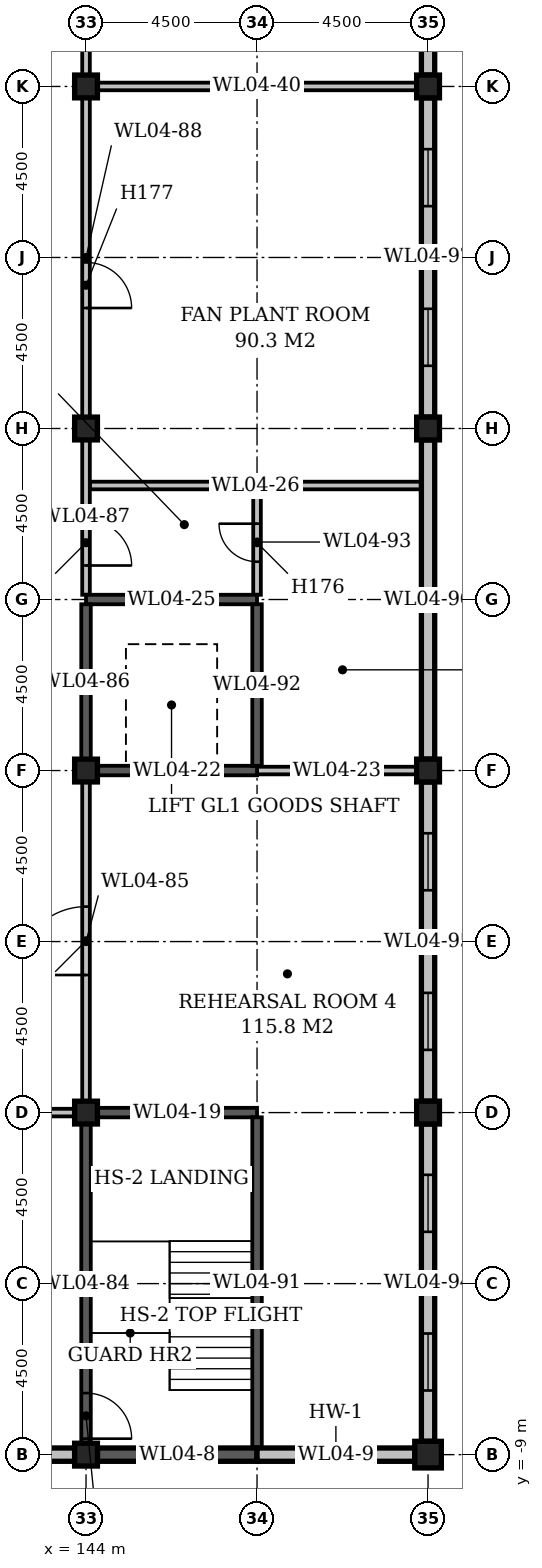
"""IFC4 building model, lengths in metres.
Left out: names, types, materials, properties, quantities, classifications, styles, units other than length and angle.
Written with IfcOpenShell. Run it as: python <this file> out.ifc"""

import sys

from ifc_helpers import new_model, si_unit, direction, frame, frame_2d, origin, origin_2d, place, context, subcontext, project, spatial, rectangle, extrude, element, fill, save


model = new_model("IFC4")
c1 = context("Model", 3, precision=1e-05, world=origin(), true_north=direction((0.0, 1.0)))
c2 = subcontext(c1, "Body", "Model", "MODEL_VIEW")
j1 = project(units=[si_unit("LENGTHUNIT", "METRE"), si_unit("PLANEANGLEUNIT", "RADIAN")], contexts=[c1])
p1 = place(None, origin())
s1 = spatial("IfcSite", under=j1, at=p1, CompositionType="ELEMENT")
p2 = place(p1, origin())
s2 = spatial("IfcBuilding", under=s1, at=p2, CompositionType="ELEMENT")
p3 = place(p2, frame((0.0, 0.0, 24.0)))
s3 = spatial("IfcBuildingStorey", under=s2, at=p3, CompositionType="ELEMENT", Elevation=24.0)
for number, where, z_axis, x_axis in (
    (1, (144.0, -9.0, 0.0), (0.0, 0.0, 1.0), (1.0, 0.0, 0.0)),
    (2, (144.0, 0.0, 0.0), (0.0, 0.0, 1.0), (1.0, 0.0, 0.0)),
    (3, (144.0, 9.0, 0.0), (0.0, 0.0, 1.0), (1.0, 0.0, 0.0)),
    (4, (144.0, 18.0, 0.0), (0.0, 0.0, 1.0), (1.0, 0.0, 0.0)),
    (5, (144.0, 27.0, 0.0), (0.0, 0.0, 1.0), (1.0, 0.0, 0.0)),
):
    element("IfcColumn", number, at=place(p3, frame(where, z_axis=z_axis, x_axis=x_axis)), inside=s3, PredefinedType="COLUMN", context=c2, shape_type="SweptSolid", body=[
        extrude(rectangle(XDim=0.6, YDim=0.6, at=origin_2d()), origin(), (0.0, 0.0, 1.0), 4.7),
    ])
p4 = place(p3, frame((153.0, -9.0, 0.0), z_axis=(0.0, 0.0, 1.0), x_axis=(1.0, 0.0, 0.0)))
e6 = element("IfcColumn", 6, at=p4, inside=s3, PredefinedType="COLUMN", context=c2, shape_type="SweptSolid", body=[
    extrude(rectangle(XDim=0.7, YDim=0.7, at=origin_2d()), origin(), (0.0, 0.0, 1.0), 4.7),
])
for number, where, z_axis, x_axis in (
    (7, (153.0, 0.0, 0.0), (0.0, 0.0, 1.0), (1.0, 0.0, 0.0)),
    (8, (153.0, 9.0, 0.0), (0.0, 0.0, 1.0), (1.0, 0.0, 0.0)),
    (9, (153.0, 18.0, 0.0), (0.0, 0.0, 1.0), (1.0, 0.0, 0.0)),
    (10, (153.0, 27.0, 0.0), (0.0, 0.0, 1.0), (1.0, 0.0, 0.0)),
):
    element("IfcColumn", number, at=place(p3, frame(where, z_axis=z_axis, x_axis=x_axis)), inside=s3, PredefinedType="COLUMN", context=c2, shape_type="SweptSolid", body=[
        extrude(rectangle(XDim=0.6, YDim=0.6, at=origin_2d()), origin(), (0.0, 0.0, 1.0), 4.7),
    ])
p5 = place(p3, frame((135.3, -9.0, 0.0), z_axis=(0.0, 0.0, 1.0), x_axis=(1.0, 0.0, 0.0)))
e11 = element("IfcWall", 11, at=p5, inside=s3, PredefinedType="STANDARD", context=c2, shape_type="SweptSolid", body=[
    extrude(rectangle(XDim=8.4, YDim=0.35, at=frame_2d((4.2, 0.0))), origin(), (0.0, 0.0, 1.0), 4.1),
])
p6 = place(p5, frame((1.35, 0.0, 1.0)))
e12 = element("IfcOpeningElement", 12, at=p6, cuts=e11, PredefinedType="OPENING", context=c2, shape_type="SweptSolid", body=[
    extrude(rectangle(XDim=1.5, YDim=2.4, at=frame_2d((0.75, 1.2))), frame((0.0, 0.187, 0.0), z_axis=(0.0, -1.0, 0.0), x_axis=(1.0, 0.0, 0.0)), (0.0, 0.0, 1.0), 0.374),
])
p7 = place(p3, frame((144.3, -9.0, 0.0), z_axis=(0.0, 0.0, 1.0), x_axis=(1.0, 0.0, 0.0)))
e13 = element("IfcWall", 13, at=p7, inside=s3, PredefinedType="STANDARD", context=c2, shape_type="SweptSolid", body=[
    extrude(rectangle(XDim=4.2, YDim=0.35, at=frame_2d((2.1, 0.0))), origin(), (0.0, 0.0, 1.0), 4.1),
])
p8 = place(p3, frame((148.5, -9.0, 0.0), z_axis=(0.0, 0.0, 1.0), x_axis=(1.0, 0.0, 0.0)))
e14 = element("IfcWall", 14, at=p8, inside=s3, PredefinedType="STANDARD", context=c2, shape_type="SweptSolid", body=[
    extrude(rectangle(XDim=4.15, YDim=0.35, at=frame_2d((2.075, 0.0))), origin(), (0.0, 0.0, 1.0), 4.1),
])
p9 = place(p8, frame((1.325, 0.0, 1.0)))
e15 = element("IfcOpeningElement", 15, at=p9, cuts=e14, PredefinedType="OPENING", context=c2, shape_type="SweptSolid", body=[
    extrude(rectangle(XDim=1.5, YDim=2.4, at=frame_2d((0.75, 1.2))), frame((0.0, 0.187, 0.0), z_axis=(0.0, -1.0, 0.0), x_axis=(1.0, 0.0, 0.0)), (0.0, 0.0, 1.0), 0.374),
])
p10 = place(p3, frame((135.4, 0.0, 0.0), z_axis=(0.0, 0.0, 1.0), x_axis=(1.0, 0.0, 0.0)))
e16 = element("IfcWall", 16, at=p10, inside=s3, PredefinedType="STANDARD", context=c2, shape_type="SweptSolid", body=[
    extrude(rectangle(XDim=8.3, YDim=0.2, at=frame_2d((4.15, 0.0))), origin(), (0.0, 0.0, 1.0), 4.7),
])
p11 = place(p10, frame((5.77, 0.0, 0.0)))
e17 = element("IfcOpeningElement", 17, at=p11, cuts=e16, PredefinedType="OPENING", context=c2, shape_type="SweptSolid", body=[
    extrude(rectangle(XDim=1.2, YDim=2.1, at=frame_2d((0.6, 1.05))), frame((0.0, 0.112, 0.0), z_axis=(0.0, -1.0, 0.0), x_axis=(1.0, 0.0, 0.0)), (0.0, 0.0, 1.0), 0.224),
])
p12 = place(p10, frame((1.37, 0.0, 0.0)))
e18 = element("IfcOpeningElement", 18, at=p12, cuts=e16, PredefinedType="OPENING", context=c2, shape_type="SweptSolid", body=[
    extrude(rectangle(XDim=1.0, YDim=2.1, at=frame_2d((0.5, 1.05))), frame((0.0, 0.112, 0.0), z_axis=(0.0, -1.0, 0.0), x_axis=(1.0, 0.0, 0.0)), (0.0, 0.0, 1.0), 0.224),
])
for number, where, z_axis, x_axis in (
    (19, (144.3, 0.0, 0.0), (0.0, 0.0, 1.0), (1.0, 0.0, 0.0)),
    (20, (144.3, 9.0, 0.0), (0.0, 0.0, 1.0), (1.0, 0.0, 0.0)),
):
    element("IfcWall", number, at=place(p3, frame(where, z_axis=z_axis, x_axis=x_axis)), inside=s3, PredefinedType="STANDARD", context=c2, shape_type="SweptSolid", body=[
        extrude(rectangle(XDim=4.2, YDim=0.25, at=frame_2d((2.1, 0.0))), origin(), (0.0, 0.0, 1.0), 4.7),
    ])
p13 = place(p3, frame((148.5, 9.0, 0.0), z_axis=(0.0, 0.0, 1.0), x_axis=(1.0, 0.0, 0.0)))
e21 = element("IfcWall", 21, at=p13, inside=s3, PredefinedType="STANDARD", context=c2, shape_type="SweptSolid", body=[
    extrude(rectangle(XDim=4.2, YDim=0.2, at=frame_2d((2.1, 0.0))), origin(), (0.0, 0.0, 1.0), 4.7),
])
p14 = place(p3, frame((144.0, 13.5, 0.0), z_axis=(0.0, 0.0, 1.0), x_axis=(1.0, 0.0, 0.0)))
e22 = element("IfcWall", 22, at=p14, inside=s3, PredefinedType="STANDARD", context=c2, shape_type="SweptSolid", body=[
    extrude(rectangle(XDim=4.5, YDim=0.25, at=frame_2d((2.25, 0.0))), origin(), (0.0, 0.0, 1.0), 4.7),
])
p15 = place(p14, frame((1.72, 0.0, 0.0)))
e23 = element("IfcOpeningElement", 23, at=p15, cuts=e22, PredefinedType="OPENING", context=c2, shape_type="SweptSolid", body=[
    extrude(rectangle(XDim=1.1, YDim=2.1, at=frame_2d((0.55, 1.05))), frame((0.0, 0.137, 0.0), z_axis=(0.0, -1.0, 0.0), x_axis=(1.0, 0.0, 0.0)), (0.0, 0.0, 1.0), 0.274),
])
p16 = place(p3, frame((144.1, 16.5, 0.0), z_axis=(0.0, 0.0, 1.0), x_axis=(1.0, 0.0, 0.0)))
e24 = element("IfcWall", 24, at=p16, inside=s3, PredefinedType="STANDARD", context=c2, shape_type="SweptSolid", body=[
    extrude(rectangle(XDim=8.725, YDim=0.2, at=frame_2d((4.362, 0.0))), origin(), (0.0, 0.0, 1.0), 4.7),
])
p17 = place(p3, frame((144.3, 27.0, 0.0), z_axis=(0.0, 0.0, 1.0), x_axis=(1.0, 0.0, 0.0)))
e25 = element("IfcWall", 25, at=p17, inside=s3, PredefinedType="STANDARD", context=c2, shape_type="SweptSolid", body=[
    extrude(rectangle(XDim=8.4, YDim=0.2, at=frame_2d((4.2, 0.0))), origin(), (0.0, 0.0, 1.0), 4.7),
])
p18 = place(p3, frame((144.0, -8.7, 0.0), z_axis=(0.0, 0.0, 1.0), x_axis=(0.0, 1.0, 0.0)))
e26 = element("IfcWall", 26, at=p18, inside=s3, PredefinedType="STANDARD", context=c2, shape_type="SweptSolid", body=[
    extrude(rectangle(XDim=8.4, YDim=0.25, at=frame_2d((4.2, 0.0))), origin(), (0.0, 0.0, 1.0), 4.7),
])
p19 = place(p18, frame((0.12, 0.0, 0.0)))
e27 = element("IfcOpeningElement", 27, at=p19, cuts=e26, PredefinedType="OPENING", context=c2, shape_type="SweptSolid", body=[
    extrude(rectangle(XDim=1.2, YDim=2.1, at=frame_2d((0.6, 1.05))), frame((0.0, 0.137, 0.0), z_axis=(0.0, -1.0, 0.0), x_axis=(1.0, 0.0, 0.0)), (0.0, 0.0, 1.0), 0.274),
])
p20 = place(p3, frame((144.0, 0.3, 0.0), z_axis=(0.0, 0.0, 1.0), x_axis=(0.0, 1.0, 0.0)))
e28 = element("IfcWall", 28, at=p20, inside=s3, PredefinedType="STANDARD", context=c2, shape_type="SweptSolid", body=[
    extrude(rectangle(XDim=8.4, YDim=0.2, at=frame_2d((4.2, 0.0))), origin(), (0.0, 0.0, 1.0), 4.7),
])
p21 = place(p20, frame((3.32, 0.0, 0.0)))
e29 = element("IfcOpeningElement", 29, at=p21, cuts=e28, PredefinedType="OPENING", context=c2, shape_type="SweptSolid", body=[
    extrude(rectangle(XDim=1.8, YDim=2.4, at=frame_2d((0.9, 1.2))), frame((0.0, 0.112, 0.0), z_axis=(0.0, -1.0, 0.0), x_axis=(1.0, 0.0, 0.0)), (0.0, 0.0, 1.0), 0.224),
])
p22 = place(p3, frame((144.0, 9.3, 0.0), z_axis=(0.0, 0.0, 1.0), x_axis=(0.0, 1.0, 0.0)))
e30 = element("IfcWall", 30, at=p22, inside=s3, PredefinedType="STANDARD", context=c2, shape_type="SweptSolid", body=[
    extrude(rectangle(XDim=4.075, YDim=0.25, at=frame_2d((2.038, 0.0))), origin(), (0.0, 0.0, 1.0), 4.7),
])
p23 = place(p3, frame((144.0, 13.625, 0.0), z_axis=(0.0, 0.0, 1.0), x_axis=(0.0, 1.0, 0.0)))
e31 = element("IfcWall", 31, at=p23, inside=s3, PredefinedType="STANDARD", context=c2, shape_type="SweptSolid", body=[
    extrude(rectangle(XDim=4.075, YDim=0.2, at=frame_2d((2.038, 0.0))), origin(), (0.0, 0.0, 1.0), 4.7),
])
p24 = place(p23, frame((0.77, 0.0, 0.0)))
e32 = element("IfcOpeningElement", 32, at=p24, cuts=e31, PredefinedType="OPENING", context=c2, shape_type="SweptSolid", body=[
    extrude(rectangle(XDim=1.2, YDim=2.1, at=frame_2d((0.6, 1.05))), frame((0.0, 0.112, 0.0), z_axis=(0.0, -1.0, 0.0), x_axis=(1.0, 0.0, 0.0)), (0.0, 0.0, 1.0), 0.224),
])
p25 = place(p3, frame((144.0, 18.3, 0.0), z_axis=(0.0, 0.0, 1.0), x_axis=(0.0, 1.0, 0.0)))
e33 = element("IfcWall", 33, at=p25, inside=s3, PredefinedType="STANDARD", context=c2, shape_type="SweptSolid", body=[
    extrude(rectangle(XDim=8.4, YDim=0.2, at=frame_2d((4.2, 0.0))), origin(), (0.0, 0.0, 1.0), 4.7),
])
p26 = place(p25, frame((2.87, 0.0, 0.0)))
e34 = element("IfcOpeningElement", 34, at=p26, cuts=e33, PredefinedType="OPENING", context=c2, shape_type="SweptSolid", body=[
    extrude(rectangle(XDim=1.2, YDim=2.1, at=frame_2d((0.6, 1.05))), frame((0.0, 0.112, 0.0), z_axis=(0.0, -1.0, 0.0), x_axis=(1.0, 0.0, 0.0)), (0.0, 0.0, 1.0), 0.224),
])
p27 = place(p3, frame((144.0, 27.3, 0.0), z_axis=(0.0, 0.0, 1.0), x_axis=(0.0, 1.0, 0.0)))
e35 = element("IfcWall", 35, at=p27, inside=s3, PredefinedType="STANDARD", context=c2, shape_type="SweptSolid", body=[
    extrude(rectangle(XDim=8.4, YDim=0.2, at=frame_2d((4.2, 0.0))), origin(), (0.0, 0.0, 1.0), 4.7),
])
p28 = place(p27, frame((3.62, 0.0, 0.0)))
e36 = element("IfcOpeningElement", 36, at=p28, cuts=e35, PredefinedType="OPENING", context=c2, shape_type="SweptSolid", body=[
    extrude(rectangle(XDim=1.2, YDim=2.1, at=frame_2d((0.6, 1.05))), frame((0.0, 0.112, 0.0), z_axis=(0.0, -1.0, 0.0), x_axis=(1.0, 0.0, 0.0)), (0.0, 0.0, 1.0), 0.224),
])
p29 = place(p3, frame((148.5, -8.825, 0.0), z_axis=(0.0, 0.0, 1.0), x_axis=(0.0, 1.0, 0.0)))
e37 = element("IfcWall", 37, at=p29, inside=s3, PredefinedType="STANDARD", context=c2, shape_type="SweptSolid", body=[
    extrude(rectangle(XDim=8.7, YDim=0.25, at=frame_2d((4.35, 0.0))), origin(), (0.0, 0.0, 1.0), 4.7),
])
p30 = place(p3, frame((148.5, 9.125, 0.0), z_axis=(0.0, 0.0, 1.0), x_axis=(0.0, 1.0, 0.0)))
e38 = element("IfcWall", 38, at=p30, inside=s3, PredefinedType="STANDARD", context=c2, shape_type="SweptSolid", body=[
    extrude(rectangle(XDim=4.25, YDim=0.25, at=frame_2d((2.125, 0.0))), origin(), (0.0, 0.0, 1.0), 4.7),
])
p31 = place(p3, frame((148.5, 13.625, 0.0), z_axis=(0.0, 0.0, 1.0), x_axis=(0.0, 1.0, 0.0)))
e39 = element("IfcWall", 39, at=p31, inside=s3, PredefinedType="STANDARD", context=c2, shape_type="SweptSolid", body=[
    extrude(rectangle(XDim=2.775, YDim=0.2, at=frame_2d((1.387, 0.0))), origin(), (0.0, 0.0, 1.0), 4.7),
])
p32 = place(p31, frame((0.87, 0.0, 0.0)))
e40 = element("IfcOpeningElement", 40, at=p32, cuts=e39, PredefinedType="OPENING", context=c2, shape_type="SweptSolid", body=[
    extrude(rectangle(XDim=1.0, YDim=2.1, at=frame_2d((0.5, 1.05))), frame((0.0, 0.112, 0.0), z_axis=(0.0, -1.0, 0.0), x_axis=(1.0, 0.0, 0.0)), (0.0, 0.0, 1.0), 0.224),
])
p33 = place(p3, frame((153.0, -8.65, 0.0), z_axis=(0.0, 0.0, 1.0), x_axis=(0.0, 1.0, 0.0)))
e41 = element("IfcWall", 41, at=p33, inside=s3, PredefinedType="STANDARD", context=c2, shape_type="SweptSolid", body=[
    extrude(rectangle(XDim=8.35, YDim=0.35, at=frame_2d((4.175, 0.0))), origin(), (0.0, 0.0, 1.0), 4.1),
])
p34 = place(p33, frame((1.337, 0.0, 1.0)))
e42 = element("IfcOpeningElement", 42, at=p34, cuts=e41, PredefinedType="OPENING", context=c2, shape_type="SweptSolid", body=[
    extrude(rectangle(XDim=1.5, YDim=2.4, at=frame_2d((0.75, 1.2))), frame((0.0, 0.187, 0.0), z_axis=(0.0, -1.0, 0.0), x_axis=(1.0, 0.0, 0.0)), (0.0, 0.0, 1.0), 0.374),
])
p35 = place(p33, frame((5.512, 0.0, 1.0)))
e43 = element("IfcOpeningElement", 43, at=p35, cuts=e41, PredefinedType="OPENING", context=c2, shape_type="SweptSolid", body=[
    extrude(rectangle(XDim=1.5, YDim=2.4, at=frame_2d((0.75, 1.2))), frame((0.0, 0.187, 0.0), z_axis=(0.0, -1.0, 0.0), x_axis=(1.0, 0.0, 0.0)), (0.0, 0.0, 1.0), 0.374),
])
p36 = place(p3, frame((153.0, 0.3, 0.0), z_axis=(0.0, 0.0, 1.0), x_axis=(0.0, 1.0, 0.0)))
e44 = element("IfcWall", 44, at=p36, inside=s3, PredefinedType="STANDARD", context=c2, shape_type="SweptSolid", body=[
    extrude(rectangle(XDim=8.4, YDim=0.35, at=frame_2d((4.2, 0.0))), origin(), (0.0, 0.0, 1.0), 4.1),
])
p37 = place(p36, frame((1.35, 0.0, 1.0)))
e45 = element("IfcOpeningElement", 45, at=p37, cuts=e44, PredefinedType="OPENING", context=c2, shape_type="SweptSolid", body=[
    extrude(rectangle(XDim=1.5, YDim=2.4, at=frame_2d((0.75, 1.2))), frame((0.0, 0.187, 0.0), z_axis=(0.0, -1.0, 0.0), x_axis=(1.0, 0.0, 0.0)), (0.0, 0.0, 1.0), 0.374),
])
p38 = place(p36, frame((5.55, 0.0, 1.0)))
e46 = element("IfcOpeningElement", 46, at=p38, cuts=e44, PredefinedType="OPENING", context=c2, shape_type="SweptSolid", body=[
    extrude(rectangle(XDim=1.5, YDim=2.4, at=frame_2d((0.75, 1.2))), frame((0.0, 0.187, 0.0), z_axis=(0.0, -1.0, 0.0), x_axis=(1.0, 0.0, 0.0)), (0.0, 0.0, 1.0), 0.374),
])
p39 = place(p3, frame((153.0, 9.3, 0.0), z_axis=(0.0, 0.0, 1.0), x_axis=(0.0, 1.0, 0.0)))
e47 = element("IfcWall", 47, at=p39, inside=s3, PredefinedType="STANDARD", context=c2, shape_type="SweptSolid", body=[
    extrude(rectangle(XDim=8.4, YDim=0.35, at=frame_2d((4.2, 0.0))), origin(), (0.0, 0.0, 1.0), 4.1),
])
p40 = place(p3, frame((153.0, 18.3, 0.0), z_axis=(0.0, 0.0, 1.0), x_axis=(0.0, 1.0, 0.0)))
e48 = element("IfcWall", 48, at=p40, inside=s3, PredefinedType="STANDARD", context=c2, shape_type="SweptSolid", body=[
    extrude(rectangle(XDim=8.4, YDim=0.35, at=frame_2d((4.2, 0.0))), origin(), (0.0, 0.0, 1.0), 4.1),
])
p41 = place(p40, frame((1.35, 0.0, 1.0)))
e49 = element("IfcOpeningElement", 49, at=p41, cuts=e48, PredefinedType="OPENING", context=c2, shape_type="SweptSolid", body=[
    extrude(rectangle(XDim=1.5, YDim=2.4, at=frame_2d((0.75, 1.2))), frame((0.0, 0.187, 0.0), z_axis=(0.0, -1.0, 0.0), x_axis=(1.0, 0.0, 0.0)), (0.0, 0.0, 1.0), 0.374),
])
p42 = place(p40, frame((5.55, 0.0, 1.0)))
e50 = element("IfcOpeningElement", 50, at=p42, cuts=e48, PredefinedType="OPENING", context=c2, shape_type="SweptSolid", body=[
    extrude(rectangle(XDim=1.5, YDim=2.4, at=frame_2d((0.75, 1.2))), frame((0.0, 0.187, 0.0), z_axis=(0.0, -1.0, 0.0), x_axis=(1.0, 0.0, 0.0)), (0.0, 0.0, 1.0), 0.374),
])
p43 = place(p3, frame((153.0, 27.3, 0.0), z_axis=(0.0, 0.0, 1.0), x_axis=(0.0, 1.0, 0.0)))
e51 = element("IfcWall", 51, at=p43, inside=s3, PredefinedType="STANDARD", context=c2, shape_type="SweptSolid", body=[
    extrude(rectangle(XDim=8.4, YDim=0.35, at=frame_2d((4.2, 0.0))), origin(), (0.0, 0.0, 1.0), 4.1),
])
p44 = place(p3, frame((89.825, -9.05, 5.0), z_axis=(0.0, 0.0, 1.0), x_axis=(1.0, 0.0, 0.0)))
e52 = element("IfcWall", 52, at=p44, inside=s3, PredefinedType="STANDARD", context=c2, shape_type="SweptSolid", body=[
    extrude(rectangle(XDim=63.35, YDim=0.25, at=frame_2d((31.675, 0.0))), origin(), (0.0, 0.0, 1.0), 1.1),
])
p45 = place(p3, frame((153.05, -8.925, 5.0), z_axis=(0.0, 0.0, 1.0), x_axis=(0.0, 1.0, 0.0)))
e53 = element("IfcWall", 53, at=p45, inside=s3, PredefinedType="STANDARD", context=c2, shape_type="SweptSolid", body=[
    extrude(rectangle(XDim=53.85, YDim=0.25, at=frame_2d((26.925, 0.0))), origin(), (0.0, 0.0, 1.0), 1.1),
])
p46 = place(p24, frame((1.2, 0.0, 0.0), z_axis=(0.0, 0.0, 1.0), x_axis=(-1.0, 0.0, 0.0)))
e54 = element("IfcDoor", 54, at=p46, inside=s3, OperationType="SINGLE_SWING_RIGHT", PredefinedType="DOOR", context=c2, shape_type="SweptSolid", body=[
    extrude(rectangle(XDim=1.2, YDim=2.1, at=frame_2d((0.6, 1.05))), frame((0.0, 0.025, 0.0), z_axis=(0.0, -1.0, 0.0), x_axis=(1.0, 0.0, 0.0)), (0.0, 0.0, 1.0), 0.05),
])
fill(e32, e54)
p47 = place(p19, frame((1.2, 0.0, 0.0), z_axis=(0.0, 0.0, 1.0), x_axis=(-1.0, 0.0, 0.0)))
e55 = element("IfcDoor", 55, at=p47, inside=s3, OperationType="SINGLE_SWING_RIGHT", PredefinedType="DOOR", context=c2, shape_type="SweptSolid", body=[
    extrude(rectangle(XDim=1.2, YDim=2.1, at=frame_2d((0.6, 1.05))), frame((0.0, 0.025, 0.0), z_axis=(0.0, -1.0, 0.0), x_axis=(1.0, 0.0, 0.0)), (0.0, 0.0, 1.0), 0.05),
])
fill(e27, e55)
p48 = place(p21, origin())
e56 = element("IfcDoor", 56, at=p48, inside=s3, OperationType="DOUBLE_DOOR_SINGLE_SWING", PredefinedType="DOOR", context=c2, shape_type="SweptSolid", body=[
    extrude(rectangle(XDim=1.8, YDim=2.4, at=frame_2d((0.9, 1.2))), frame((0.0, 0.025, 0.0), z_axis=(0.0, -1.0, 0.0), x_axis=(1.0, 0.0, 0.0)), (0.0, 0.0, 1.0), 0.05),
])
fill(e29, e56)
p49 = place(p32, frame((1.0, 0.0, 0.0), z_axis=(0.0, 0.0, 1.0), x_axis=(-1.0, 0.0, 0.0)))
e57 = element("IfcDoor", 57, at=p49, inside=s3, OperationType="SINGLE_SWING_LEFT", PredefinedType="DOOR", context=c2, shape_type="SweptSolid", body=[
    extrude(rectangle(XDim=1.0, YDim=2.1, at=frame_2d((0.5, 1.05))), frame((0.0, 0.025, 0.0), z_axis=(0.0, -1.0, 0.0), x_axis=(1.0, 0.0, 0.0)), (0.0, 0.0, 1.0), 0.05),
])
fill(e40, e57)
p50 = place(p26, frame((1.2, 0.0, 0.0), z_axis=(0.0, 0.0, 1.0), x_axis=(-1.0, 0.0, 0.0)))
e58 = element("IfcDoor", 58, at=p50, inside=s3, OperationType="SINGLE_SWING_RIGHT", PredefinedType="DOOR", context=c2, shape_type="SweptSolid", body=[
    extrude(rectangle(XDim=1.2, YDim=2.1, at=frame_2d((0.6, 1.05))), frame((0.0, 0.025, 0.0), z_axis=(0.0, -1.0, 0.0), x_axis=(1.0, 0.0, 0.0)), (0.0, 0.0, 1.0), 0.05),
])
fill(e34, e58)
p51 = place(p15, origin())
e59 = element("IfcDoor", 59, at=p51, inside=s3, OperationType="SLIDING_TO_LEFT", PredefinedType="DOOR", context=c2, shape_type="SweptSolid", body=[
    extrude(rectangle(XDim=1.1, YDim=2.1, at=frame_2d((0.55, 1.05))), frame((0.0, 0.025, 0.0), z_axis=(0.0, -1.0, 0.0), x_axis=(1.0, 0.0, 0.0)), (0.0, 0.0, 1.0), 0.05),
])
fill(e23, e59)
p52 = place(p9, origin())
e60 = element("IfcWindow", 60, at=p52, inside=s3, PartitioningType="SINGLE_PANEL", PredefinedType="WINDOW", context=c2, shape_type="SweptSolid", body=[
    extrude(rectangle(XDim=1.5, YDim=2.4, at=frame_2d((0.75, 1.2))), frame((0.0, 0.03, 0.0), z_axis=(0.0, -1.0, 0.0), x_axis=(1.0, 0.0, 0.0)), (0.0, 0.0, 1.0), 0.06),
])
fill(e15, e60)
p53 = place(p34, origin())
e61 = element("IfcWindow", 61, at=p53, inside=s3, PartitioningType="SINGLE_PANEL", PredefinedType="WINDOW", context=c2, shape_type="SweptSolid", body=[
    extrude(rectangle(XDim=1.5, YDim=2.4, at=frame_2d((0.75, 1.2))), frame((0.0, 0.03, 0.0), z_axis=(0.0, -1.0, 0.0), x_axis=(1.0, 0.0, 0.0)), (0.0, 0.0, 1.0), 0.06),
])
fill(e42, e61)
p54 = place(p35, origin())
e62 = element("IfcWindow", 62, at=p54, inside=s3, PartitioningType="SINGLE_PANEL", PredefinedType="WINDOW", context=c2, shape_type="SweptSolid", body=[
    extrude(rectangle(XDim=1.5, YDim=2.4, at=frame_2d((0.75, 1.2))), frame((0.0, 0.03, 0.0), z_axis=(0.0, -1.0, 0.0), x_axis=(1.0, 0.0, 0.0)), (0.0, 0.0, 1.0), 0.06),
])
fill(e43, e62)
p55 = place(p37, origin())
e63 = element("IfcWindow", 63, at=p55, inside=s3, PartitioningType="SINGLE_PANEL", PredefinedType="WINDOW", context=c2, shape_type="SweptSolid", body=[
    extrude(rectangle(XDim=1.5, YDim=2.4, at=frame_2d((0.75, 1.2))), frame((0.0, 0.03, 0.0), z_axis=(0.0, -1.0, 0.0), x_axis=(1.0, 0.0, 0.0)), (0.0, 0.0, 1.0), 0.06),
])
fill(e45, e63)
p56 = place(p38, origin())
e64 = element("IfcWindow", 64, at=p56, inside=s3, PartitioningType="SINGLE_PANEL", PredefinedType="WINDOW", context=c2, shape_type="SweptSolid", body=[
    extrude(rectangle(XDim=1.5, YDim=2.4, at=frame_2d((0.75, 1.2))), frame((0.0, 0.03, 0.0), z_axis=(0.0, -1.0, 0.0), x_axis=(1.0, 0.0, 0.0)), (0.0, 0.0, 1.0), 0.06),
])
fill(e46, e64)
p57 = place(p41, origin())
e65 = element("IfcWindow", 65, at=p57, inside=s3, PartitioningType="SINGLE_PANEL", PredefinedType="WINDOW", context=c2, shape_type="SweptSolid", body=[
    extrude(rectangle(XDim=1.5, YDim=2.4, at=frame_2d((0.75, 1.2))), frame((0.0, 0.03, 0.0), z_axis=(0.0, -1.0, 0.0), x_axis=(1.0, 0.0, 0.0)), (0.0, 0.0, 1.0), 0.06),
])
fill(e49, e65)
p58 = place(p42, origin())
e66 = element("IfcWindow", 66, at=p58, inside=s3, PartitioningType="SINGLE_PANEL", PredefinedType="WINDOW", context=c2, shape_type="SweptSolid", body=[
    extrude(rectangle(XDim=1.5, YDim=2.4, at=frame_2d((0.75, 1.2))), frame((0.0, 0.03, 0.0), z_axis=(0.0, -1.0, 0.0), x_axis=(1.0, 0.0, 0.0)), (0.0, 0.0, 1.0), 0.06),
])
fill(e50, e66)
save(model, sys.argv[1])
